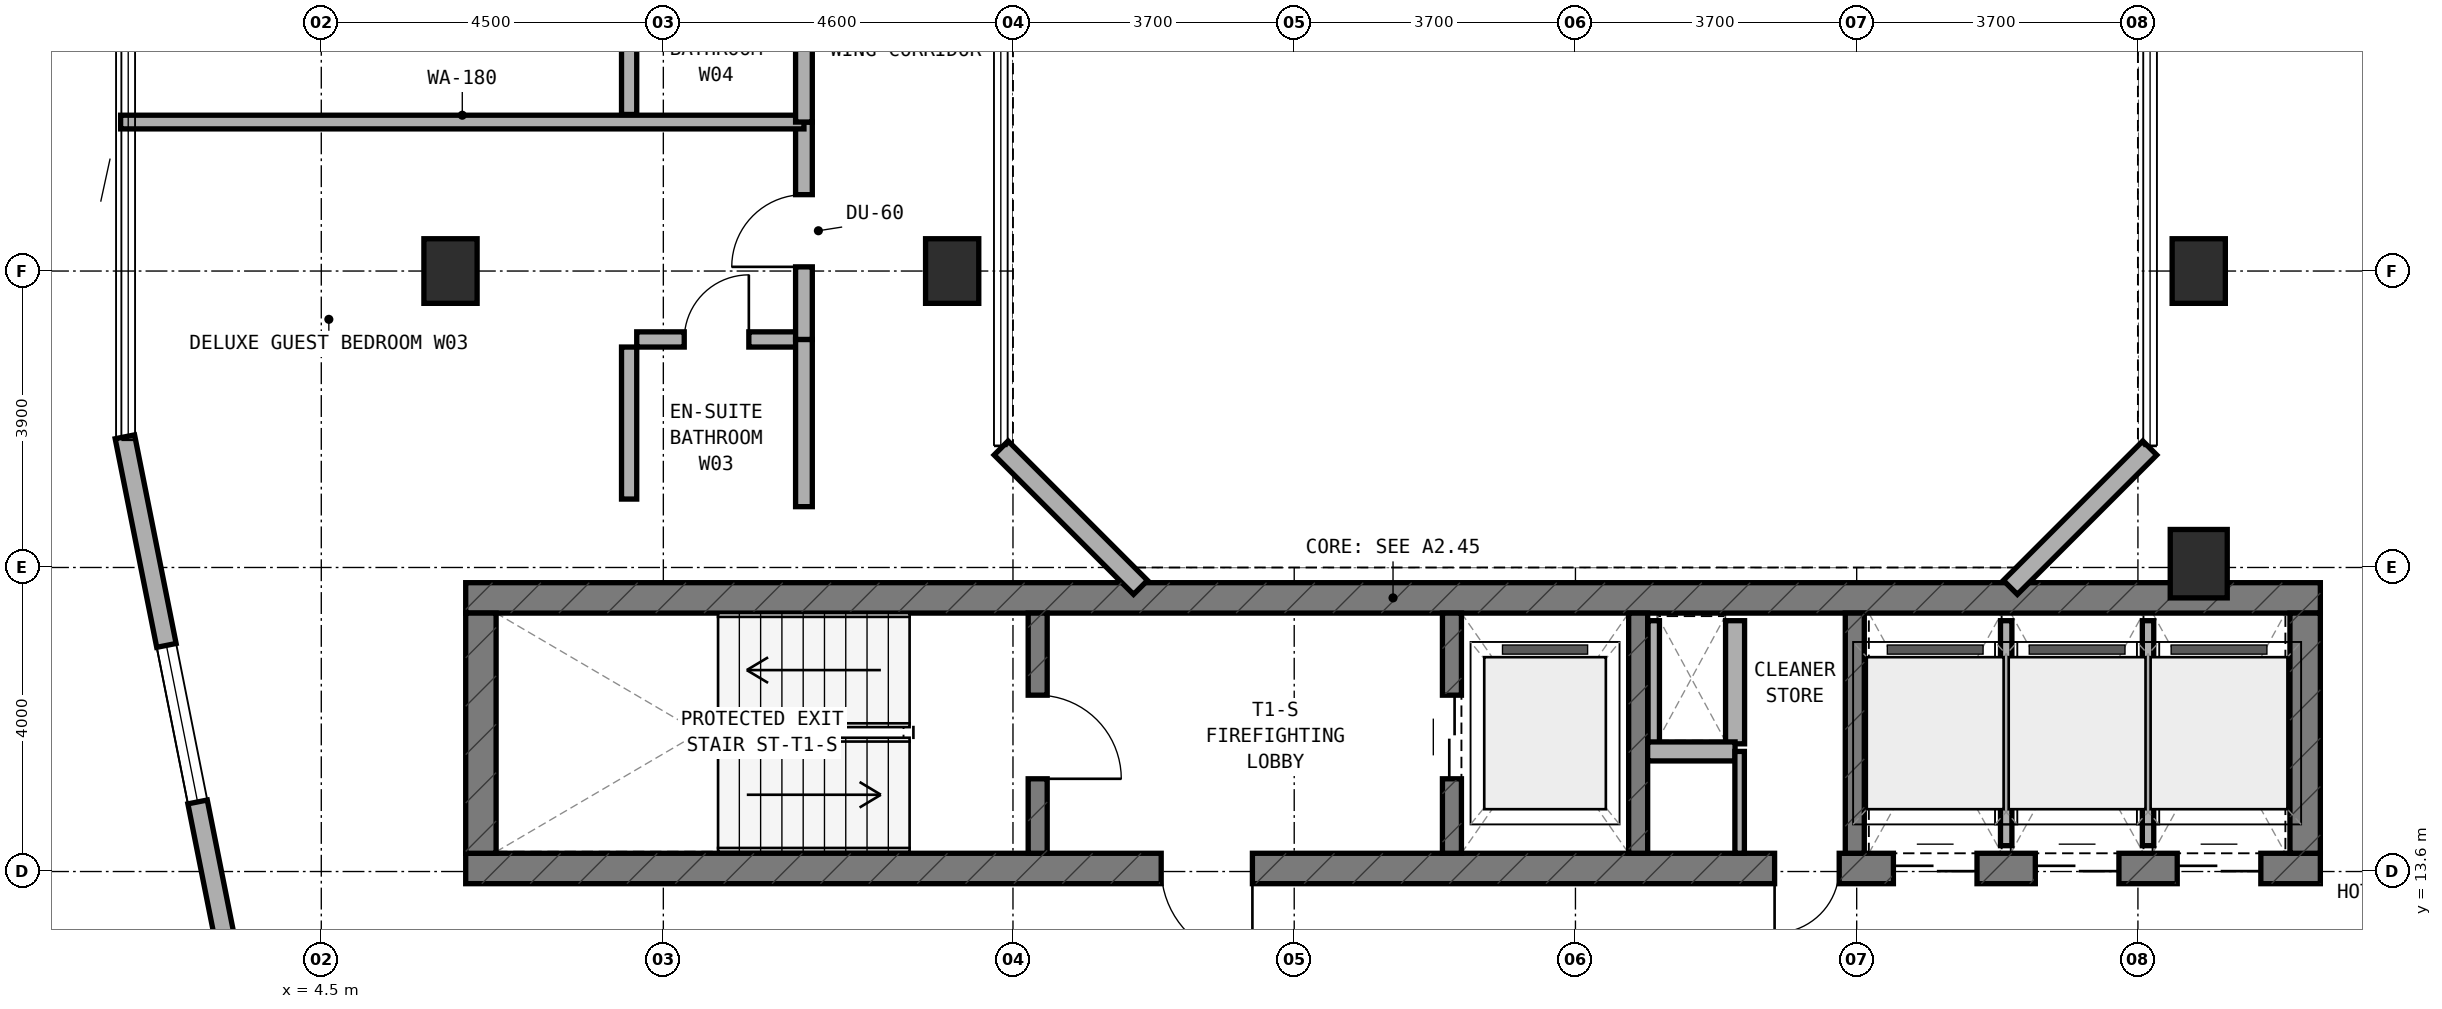
"""IFC4 building model, lengths in metres.
Left out: names, types, materials, properties, quantities, classifications, styles, units other than length and angle.
Written with IfcOpenShell. Run it as: python <this file> out.ifc"""

import sys

from ifc_helpers import new_model, si_unit, direction, frame, frame_2d, origin, origin_2d, place, context, subcontext, project, spatial, rectangle, extrude, element, fill, save


model = new_model("IFC4")
c1 = context("Model", 3, precision=1e-05, world=origin(), true_north=direction((0.0, 1.0)))
c2 = subcontext(c1, "Body", "Model", "MODEL_VIEW")
j1 = project(units=[si_unit("LENGTHUNIT", "METRE"), si_unit("PLANEANGLEUNIT", "RADIAN")], contexts=[c1])
p1 = place(None, origin())
s1 = spatial("IfcSite", under=j1, at=p1, CompositionType="ELEMENT")
p2 = place(p1, origin())
s2 = spatial("IfcBuilding", under=s1, at=p2, CompositionType="ELEMENT")
p3 = place(p2, frame((0.0, 0.0, 209.9)))
s3 = spatial("IfcBuildingStorey", under=s2, at=p3, CompositionType="ELEMENT", Elevation=209.9)
p4 = place(p3, frame((6.4, 13.64, 0.0), z_axis=(0.0, 0.0, 1.0), x_axis=(1.0, 0.0, 0.0)))
e1 = element("IfcWall", 1, at=p4, inside=s3, PredefinedType="SHEAR", context=c2, shape_type="SweptSolid", body=[
    extrude(rectangle(XDim=24.4, YDim=0.4, at=frame_2d((12.2, 0.0))), origin(), (0.0, 0.0, 1.0), 3.6),
])
p5 = place(p4, frame((9.15, 0.0, 0.0)))
e2 = element("IfcOpeningElement", 2, at=p5, cuts=e1, PredefinedType="OPENING", context=c2, shape_type="SweptSolid", body=[
    extrude(rectangle(XDim=1.2, YDim=2.15, at=frame_2d((0.6, 1.075))), frame((0.0, 0.21, 0.0), z_axis=(0.0, -1.0, 0.0), x_axis=(1.0, 0.0, 0.0)), (0.0, 0.0, 1.0), 0.42),
])
p6 = place(p4, frame((17.22, 0.0, 0.0)))
e3 = element("IfcOpeningElement", 3, at=p6, cuts=e1, PredefinedType="OPENING", context=c2, shape_type="SweptSolid", body=[
    extrude(rectangle(XDim=0.85, YDim=2.1, at=frame_2d((0.425, 1.05))), frame((0.0, 0.21, 0.0), z_axis=(0.0, -1.0, 0.0), x_axis=(1.0, 0.0, 0.0)), (0.0, 0.0, 1.0), 0.42),
])
p7 = place(p4, frame((18.783, 0.0, 0.0)))
e4 = element("IfcOpeningElement", 4, at=p7, cuts=e1, PredefinedType="OPENING", context=c2, shape_type="SweptSolid", body=[
    extrude(rectangle(XDim=1.1, YDim=2.15, at=frame_2d((0.55, 1.075))), frame((0.0, 0.21, 0.0), z_axis=(0.0, -1.0, 0.0), x_axis=(1.0, 0.0, 0.0)), (0.0, 0.0, 1.0), 0.42),
])
p8 = place(p4, frame((20.65, 0.0, 0.0)))
e5 = element("IfcOpeningElement", 5, at=p8, cuts=e1, PredefinedType="OPENING", context=c2, shape_type="SweptSolid", body=[
    extrude(rectangle(XDim=1.1, YDim=2.15, at=frame_2d((0.55, 1.075))), frame((0.0, 0.21, 0.0), z_axis=(0.0, -1.0, 0.0), x_axis=(1.0, 0.0, 0.0)), (0.0, 0.0, 1.0), 0.42),
])
p9 = place(p4, frame((22.517, 0.0, 0.0)))
e6 = element("IfcOpeningElement", 6, at=p9, cuts=e1, PredefinedType="OPENING", context=c2, shape_type="SweptSolid", body=[
    extrude(rectangle(XDim=1.1, YDim=2.15, at=frame_2d((0.55, 1.075))), frame((0.0, 0.21, 0.0), z_axis=(0.0, -1.0, 0.0), x_axis=(1.0, 0.0, 0.0)), (0.0, 0.0, 1.0), 0.42),
])
p10 = place(p3, frame((6.4, 17.2, 0.0), z_axis=(0.0, 0.0, 1.0), x_axis=(1.0, 0.0, 0.0)))
e7 = element("IfcWall", 7, at=p10, inside=s3, PredefinedType="SHEAR", context=c2, shape_type="SweptSolid", body=[
    extrude(rectangle(XDim=24.4, YDim=0.4, at=frame_2d((12.2, 0.0))), origin(), (0.0, 0.0, 1.0), 3.6),
])
for number, where, z_axis, x_axis in (
    (8, (6.6, 13.84, 0.0), (0.0, 0.0, 1.0), (0.0, 1.0, 0.0)),
    (9, (30.6, 13.84, 0.0), (0.0, 0.0, 1.0), (0.0, 1.0, 0.0)),
):
    element("IfcWall", number, at=place(p3, frame(where, z_axis=z_axis, x_axis=x_axis)), inside=s3, PredefinedType="SHEAR", context=c2, shape_type="SweptSolid", body=[
        extrude(rectangle(XDim=3.16, YDim=0.4, at=frame_2d((1.58, 0.0))), origin(), (0.0, 0.0, 1.0), 3.6),
    ])
p11 = place(p3, frame((13.925, 13.84, 0.0), z_axis=(0.0, 0.0, 1.0), x_axis=(0.0, 1.0, 0.0)))
e10 = element("IfcWall", 10, at=p11, inside=s3, PredefinedType="STANDARD", context=c2, shape_type="SweptSolid", body=[
    extrude(rectangle(XDim=3.16, YDim=0.25, at=frame_2d((1.58, 0.0))), origin(), (0.0, 0.0, 1.0), 3.32),
])
p12 = place(p11, frame((0.98, 0.0, 0.0)))
e11 = element("IfcOpeningElement", 11, at=p12, cuts=e10, PredefinedType="OPENING", context=c2, shape_type="SweptSolid", body=[
    extrude(rectangle(XDim=1.1, YDim=2.15, at=frame_2d((0.55, 1.075))), frame((0.0, 0.135, 0.0), z_axis=(0.0, -1.0, 0.0), x_axis=(1.0, 0.0, 0.0)), (0.0, 0.0, 1.0), 0.27),
])
p13 = place(p3, frame((19.375, 13.84, 0.0), z_axis=(0.0, 0.0, 1.0), x_axis=(0.0, 1.0, 0.0)))
e12 = element("IfcWall", 12, at=p13, inside=s3, PredefinedType="STANDARD", context=c2, shape_type="SweptSolid", body=[
    extrude(rectangle(XDim=3.16, YDim=0.25, at=frame_2d((1.58, 0.0))), origin(), (0.0, 0.0, 1.0), 3.32),
])
p14 = place(p13, frame((0.98, 0.0, 0.0)))
e13 = element("IfcOpeningElement", 13, at=p14, cuts=e12, PredefinedType="OPENING", context=c2, shape_type="SweptSolid", body=[
    extrude(rectangle(XDim=1.1, YDim=2.15, at=frame_2d((0.55, 1.075))), frame((0.0, 0.135, 0.0), z_axis=(0.0, -1.0, 0.0), x_axis=(1.0, 0.0, 0.0)), (0.0, 0.0, 1.0), 0.27),
])
for number, where, z_axis, x_axis in (
    (14, (21.825, 13.84, 0.0), (0.0, 0.0, 1.0), (0.0, 1.0, 0.0)),
    (15, (24.675, 13.84, 0.0), (0.0, 0.0, 1.0), (0.0, 1.0, 0.0)),
):
    element("IfcWall", number, at=place(p3, frame(where, z_axis=z_axis, x_axis=x_axis)), inside=s3, PredefinedType="STANDARD", context=c2, shape_type="SweptSolid", body=[
        extrude(rectangle(XDim=3.16, YDim=0.25, at=frame_2d((1.58, 0.0))), origin(), (0.0, 0.0, 1.0), 3.32),
    ])
for number, where, z_axis, x_axis in (
    (16, (6.2, 21.5, 0.0), (0.0, 0.0, 1.0), (1.0, 0.0, 0.0)),
    (17, (12.8, 21.5, 0.0), (0.0, 0.0, 1.0), (1.0, 0.0, 0.0)),
):
    element("IfcColumn", number, at=place(p3, frame(where, z_axis=z_axis, x_axis=x_axis)), inside=s3, PredefinedType="COLUMN", context=c2, shape_type="SweptSolid", body=[
        extrude(rectangle(XDim=0.7, YDim=0.85, at=origin_2d()), origin(), (0.0, 0.0, 1.0), 3.6),
    ])
p15 = place(p3, frame((29.2, 17.65, 0.0), z_axis=(0.0, 0.0, 1.0), x_axis=(1.0, 0.0, 0.0)))
e18 = element("IfcColumn", 18, at=p15, inside=s3, PredefinedType="COLUMN", context=c2, shape_type="SweptSolid", body=[
    extrude(rectangle(XDim=0.75, YDim=0.9, at=origin_2d()), origin(), (0.0, 0.0, 1.0), 3.6),
])
p16 = place(p3, frame((29.2, 21.5, 0.0), z_axis=(0.0, 0.0, 1.0), x_axis=(1.0, 0.0, 0.0)))
e19 = element("IfcColumn", 19, at=p16, inside=s3, PredefinedType="COLUMN", context=c2, shape_type="SweptSolid", body=[
    extrude(rectangle(XDim=0.7, YDim=0.85, at=origin_2d()), origin(), (0.0, 0.0, 1.0), 3.6),
])
p17 = place(p3, frame((1.916, 19.319, 0.0), z_axis=(0.0, 0.0, 1.0), x_axis=(0.195291715883, -0.980745199176, 0.0)))
e20 = element("IfcWall", 20, at=p17, inside=s3, PredefinedType="STANDARD", context=c2, shape_type="SweptSolid", body=[
    extrude(rectangle(XDim=8.771, YDim=0.26, at=frame_2d((4.385, 0.0))), origin(), (0.0, 0.0, 1.0), 3.32),
])
p18 = place(p17, frame((2.798, 0.0, 0.85)))
e21 = element("IfcOpeningElement", 21, at=p18, cuts=e20, PredefinedType="OPENING", context=c2, shape_type="SweptSolid", body=[
    extrude(rectangle(XDim=2.1, YDim=1.5, at=frame_2d((1.05, 0.75))), frame((0.0, 0.14, 0.0), z_axis=(0.0, -1.0, 0.0), x_axis=(1.0, 0.0, 0.0)), (0.0, 0.0, 1.0), 0.28),
])
for number, where, z_axis, x_axis in (
    (22, (26.722, 17.338, 0.0), (0.0, 0.0, 1.0), (0.707, 0.707, 0.0)),
    (23, (13.444, 19.172, 0.0), (0.0, 0.0, 1.0), (0.707, -0.707, 0.0)),
):
    element("IfcWall", number, at=place(p3, frame(where, z_axis=z_axis, x_axis=x_axis)), inside=s3, PredefinedType="STANDARD", context=c2, shape_type="SweptSolid", body=[
        extrude(rectangle(XDim=2.594, YDim=0.26, at=frame_2d((1.297, 0.0))), origin(), (0.0, 0.0, 1.0), 3.32),
    ])
p19 = place(p3, frame((22.03, 15.28, 0.0), z_axis=(0.0, 0.0, 1.0), x_axis=(0.0, 1.0, 0.0)))
e24 = element("IfcWall", 24, at=p19, inside=s3, PredefinedType="PARTITIONING", context=c2, shape_type="SweptSolid", body=[
    extrude(rectangle(XDim=1.62, YDim=0.15, at=frame_2d((0.81, 0.0))), origin(), (0.0, 0.0, 1.0), 3.32),
])
p20 = place(p3, frame((23.1, 15.28, 0.0), z_axis=(0.0, 0.0, 1.0), x_axis=(0.0, 1.0, 0.0)))
e25 = element("IfcWall", 25, at=p20, inside=s3, PredefinedType="SOLIDWALL", context=c2, shape_type="SweptSolid", body=[
    extrude(rectangle(XDim=1.62, YDim=0.25, at=frame_2d((0.81, 0.0))), origin(), (0.0, 0.0, 1.0), 3.32),
])
p21 = place(p3, frame((21.95, 15.18, 0.0), z_axis=(0.0, 0.0, 1.0), x_axis=(1.0, 0.0, 0.0)))
e26 = element("IfcWall", 26, at=p21, inside=s3, PredefinedType="SOLIDWALL", context=c2, shape_type="SweptSolid", body=[
    extrude(rectangle(XDim=1.15, YDim=0.25, at=frame_2d((0.575, 0.0))), origin(), (0.0, 0.0, 1.0), 3.32),
])
p22 = place(p3, frame((23.16, 13.84, 0.0), z_axis=(0.0, 0.0, 1.0), x_axis=(0.0, 1.0, 0.0)))
e27 = element("IfcWall", 27, at=p22, inside=s3, PredefinedType="PARTITIONING", context=c2, shape_type="SweptSolid", body=[
    extrude(rectangle(XDim=1.34, YDim=0.125, at=frame_2d((0.67, 0.0))), origin(), (0.0, 0.0, 1.0), 3.32),
])
p23 = place(p3, frame((26.667, 13.94, 0.0), z_axis=(0.0, 0.0, 1.0), x_axis=(0.0, 1.0, 0.0)))
e28 = element("IfcWall", 28, at=p23, inside=s3, PredefinedType="PARTITIONING", context=c2, shape_type="SweptSolid", body=[
    extrude(rectangle(XDim=2.96, YDim=0.15, at=frame_2d((1.48, 0.0))), origin(), (0.0, 0.0, 1.0), 3.32),
])
p24 = place(p3, frame((28.533, 13.94, 0.0), z_axis=(0.0, 0.0, 1.0), x_axis=(0.0, 1.0, 0.0)))
e29 = element("IfcWall", 29, at=p24, inside=s3, PredefinedType="PARTITIONING", context=c2, shape_type="SweptSolid", body=[
    extrude(rectangle(XDim=2.96, YDim=0.15, at=frame_2d((1.48, 0.0))), origin(), (0.0, 0.0, 1.0), 2.695),
])
p25 = place(p3, frame((8.65, 20.6, 0.0), z_axis=(0.0, 0.0, 1.0), x_axis=(1.0, 0.0, 0.0)))
e30 = element("IfcWall", 30, at=p25, inside=s3, PredefinedType="PLUMBINGWALL", context=c2, shape_type="SweptSolid", body=[
    extrude(rectangle(XDim=2.1, YDim=0.2, at=frame_2d((1.05, 0.0))), origin(), (0.0, 0.0, 1.0), 3.32),
])
p26 = place(p25, frame((0.625, 0.0, 0.0)))
e31 = element("IfcOpeningElement", 31, at=p26, cuts=e30, PredefinedType="OPENING", context=c2, shape_type="SweptSolid", body=[
    extrude(rectangle(XDim=0.85, YDim=2.1, at=frame_2d((0.425, 1.05))), frame((0.0, 0.11, 0.0), z_axis=(0.0, -1.0, 0.0), x_axis=(1.0, 0.0, 0.0)), (0.0, 0.0, 1.0), 0.22),
])
p27 = place(p3, frame((8.55, 18.5, 0.0), z_axis=(0.0, 0.0, 1.0), x_axis=(0.0, 1.0, 0.0)))
e32 = element("IfcWall", 32, at=p27, inside=s3, PredefinedType="PLUMBINGWALL", context=c2, shape_type="SweptSolid", body=[
    extrude(rectangle(XDim=2.0, YDim=0.2, at=frame_2d((1.0, 0.0))), origin(), (0.0, 0.0, 1.0), 3.32),
])
p28 = place(p3, frame((10.85, 18.4, 0.0), z_axis=(0.0, 0.0, 1.0), x_axis=(0.0, 1.0, 0.0)))
e33 = element("IfcWall", 33, at=p28, inside=s3, PredefinedType="SOLIDWALL", context=c2, shape_type="SweptSolid", body=[
    extrude(rectangle(XDim=2.2, YDim=0.22, at=frame_2d((1.1, 0.0))), origin(), (0.0, 0.0, 1.0), 3.32),
])
p29 = place(p3, frame((10.85, 20.6, 0.0), z_axis=(0.0, 0.0, 1.0), x_axis=(0.0, 1.0, 0.0)))
e34 = element("IfcWall", 34, at=p29, inside=s3, PredefinedType="SOLIDWALL", context=c2, shape_type="SweptSolid", body=[
    extrude(rectangle(XDim=2.86, YDim=0.22, at=frame_2d((1.43, 0.0))), origin(), (0.0, 0.0, 1.0), 2.695),
])
p30 = place(p29, frame((0.955, 0.0, 0.0)))
e35 = element("IfcOpeningElement", 35, at=p30, cuts=e34, PredefinedType="OPENING", context=c2, shape_type="SweptSolid", body=[
    extrude(rectangle(XDim=0.95, YDim=2.1, at=frame_2d((0.475, 1.05))), frame((0.0, 0.12, 0.0), z_axis=(0.0, -1.0, 0.0), x_axis=(1.0, 0.0, 0.0)), (0.0, 0.0, 1.0), 0.24),
])
p31 = place(p3, frame((1.86, 23.46, 0.0), z_axis=(0.0, 0.0, 1.0), x_axis=(1.0, 0.0, 0.0)))
e36 = element("IfcWall", 36, at=p31, inside=s3, PredefinedType="SOLIDWALL", context=c2, shape_type="SweptSolid", body=[
    extrude(rectangle(XDim=8.99, YDim=0.18, at=frame_2d((4.495, 0.0))), origin(), (0.0, 0.0, 1.0), 3.015),
])
p32 = place(p3, frame((8.55, 23.56, 0.0), z_axis=(0.0, 0.0, 1.0), x_axis=(0.0, 1.0, 0.0)))
e37 = element("IfcWall", 37, at=p32, inside=s3, PredefinedType="PLUMBINGWALL", context=c2, shape_type="SweptSolid", body=[
    extrude(rectangle(XDim=2.0, YDim=0.2, at=frame_2d((1.0, 0.0))), origin(), (0.0, 0.0, 1.0), 3.32),
])
p33 = place(p3, frame((10.85, 23.46, 0.0), z_axis=(0.0, 0.0, 1.0), x_axis=(0.0, 1.0, 0.0)))
e38 = element("IfcWall", 38, at=p33, inside=s3, PredefinedType="SOLIDWALL", context=c2, shape_type="SweptSolid", body=[
    extrude(rectangle(XDim=2.2, YDim=0.22, at=frame_2d((1.1, 0.0))), origin(), (0.0, 0.0, 1.0), 3.32),
])
p34 = place(p18, origin())
e39 = element("IfcWindow", 39, at=p34, inside=s3, PartitioningType="SINGLE_PANEL", PredefinedType="WINDOW", context=c2, shape_type="SweptSolid", body=[
    extrude(rectangle(XDim=2.1, YDim=1.5, at=frame_2d((1.05, 0.75))), frame((0.0, 0.03, 0.0), z_axis=(0.0, -1.0, 0.0), x_axis=(1.0, 0.0, 0.0)), (0.0, 0.0, 1.0), 0.06),
])
fill(e21, e39)
p35 = place(p12, frame((1.1, 0.0, 0.0), z_axis=(0.0, 0.0, 1.0), x_axis=(-1.0, 0.0, 0.0)))
e40 = element("IfcDoor", 40, at=p35, inside=s3, OperationType="SINGLE_SWING_RIGHT", PredefinedType="DOOR", context=c2, shape_type="SweptSolid", body=[
    extrude(rectangle(XDim=1.1, YDim=2.15, at=frame_2d((0.55, 1.075))), frame((0.0, 0.025, 0.0), z_axis=(0.0, -1.0, 0.0), x_axis=(1.0, 0.0, 0.0)), (0.0, 0.0, 1.0), 0.05),
])
fill(e11, e40)
p36 = place(p5, frame((1.2, 0.0, 0.0), z_axis=(0.0, 0.0, 1.0), x_axis=(-1.0, 0.0, 0.0)))
e41 = element("IfcDoor", 41, at=p36, inside=s3, OperationType="SINGLE_SWING_LEFT", PredefinedType="DOOR", context=c2, shape_type="SweptSolid", body=[
    extrude(rectangle(XDim=1.2, YDim=2.15, at=frame_2d((0.6, 1.075))), frame((0.0, 0.025, 0.0), z_axis=(0.0, -1.0, 0.0), x_axis=(1.0, 0.0, 0.0)), (0.0, 0.0, 1.0), 0.05),
])
fill(e2, e41)
p37 = place(p14, origin())
e42 = element("IfcDoor", 42, at=p37, inside=s3, OperationType="DOUBLE_DOOR_SLIDING", PredefinedType="DOOR", context=c2, shape_type="SweptSolid", body=[
    extrude(rectangle(XDim=1.1, YDim=2.15, at=frame_2d((0.55, 1.075))), frame((0.0, 0.025, 0.0), z_axis=(0.0, -1.0, 0.0), x_axis=(1.0, 0.0, 0.0)), (0.0, 0.0, 1.0), 0.05),
])
fill(e13, e42)
p38 = place(p6, frame((0.85, 0.0, 0.0), z_axis=(0.0, 0.0, 1.0), x_axis=(-1.0, 0.0, 0.0)))
e43 = element("IfcDoor", 43, at=p38, inside=s3, OperationType="SINGLE_SWING_RIGHT", PredefinedType="DOOR", context=c2, shape_type="SweptSolid", body=[
    extrude(rectangle(XDim=0.85, YDim=2.1, at=frame_2d((0.425, 1.05))), frame((0.0, 0.025, 0.0), z_axis=(0.0, -1.0, 0.0), x_axis=(1.0, 0.0, 0.0)), (0.0, 0.0, 1.0), 0.05),
])
fill(e3, e43)
p39 = place(p7, frame((1.1, 0.0, 0.0), z_axis=(0.0, 0.0, 1.0), x_axis=(-1.0, 0.0, 0.0)))
e44 = element("IfcDoor", 44, at=p39, inside=s3, OperationType="DOUBLE_DOOR_SLIDING", PredefinedType="DOOR", context=c2, shape_type="SweptSolid", body=[
    extrude(rectangle(XDim=1.1, YDim=2.15, at=frame_2d((0.55, 1.075))), frame((0.0, 0.025, 0.0), z_axis=(0.0, -1.0, 0.0), x_axis=(1.0, 0.0, 0.0)), (0.0, 0.0, 1.0), 0.05),
])
fill(e4, e44)
p40 = place(p8, frame((1.1, 0.0, 0.0), z_axis=(0.0, 0.0, 1.0), x_axis=(-1.0, 0.0, 0.0)))
e45 = element("IfcDoor", 45, at=p40, inside=s3, OperationType="DOUBLE_DOOR_SLIDING", PredefinedType="DOOR", context=c2, shape_type="SweptSolid", body=[
    extrude(rectangle(XDim=1.1, YDim=2.15, at=frame_2d((0.55, 1.075))), frame((0.0, 0.025, 0.0), z_axis=(0.0, -1.0, 0.0), x_axis=(1.0, 0.0, 0.0)), (0.0, 0.0, 1.0), 0.05),
])
fill(e5, e45)
p41 = place(p9, frame((1.1, 0.0, 0.0), z_axis=(0.0, 0.0, 1.0), x_axis=(-1.0, 0.0, 0.0)))
e46 = element("IfcDoor", 46, at=p41, inside=s3, OperationType="DOUBLE_DOOR_SLIDING", PredefinedType="DOOR", context=c2, shape_type="SweptSolid", body=[
    extrude(rectangle(XDim=1.1, YDim=2.15, at=frame_2d((0.55, 1.075))), frame((0.0, 0.025, 0.0), z_axis=(0.0, -1.0, 0.0), x_axis=(1.0, 0.0, 0.0)), (0.0, 0.0, 1.0), 0.05),
])
fill(e6, e46)
p42 = place(p26, origin())
e47 = element("IfcDoor", 47, at=p42, inside=s3, OperationType="SINGLE_SWING_RIGHT", PredefinedType="DOOR", context=c2, shape_type="SweptSolid", body=[
    extrude(rectangle(XDim=0.85, YDim=2.1, at=frame_2d((0.425, 1.05))), frame((0.0, 0.025, 0.0), z_axis=(0.0, -1.0, 0.0), x_axis=(1.0, 0.0, 0.0)), (0.0, 0.0, 1.0), 0.05),
])
fill(e31, e47)
p43 = place(p30, origin())
e48 = element("IfcDoor", 48, at=p43, inside=s3, OperationType="SINGLE_SWING_LEFT", PredefinedType="DOOR", context=c2, shape_type="SweptSolid", body=[
    extrude(rectangle(XDim=0.95, YDim=2.1, at=frame_2d((0.475, 1.05))), frame((0.0, 0.025, 0.0), z_axis=(0.0, -1.0, 0.0), x_axis=(1.0, 0.0, 0.0)), (0.0, 0.0, 1.0), 0.05),
])
fill(e35, e48)
save(model, sys.argv[1])
